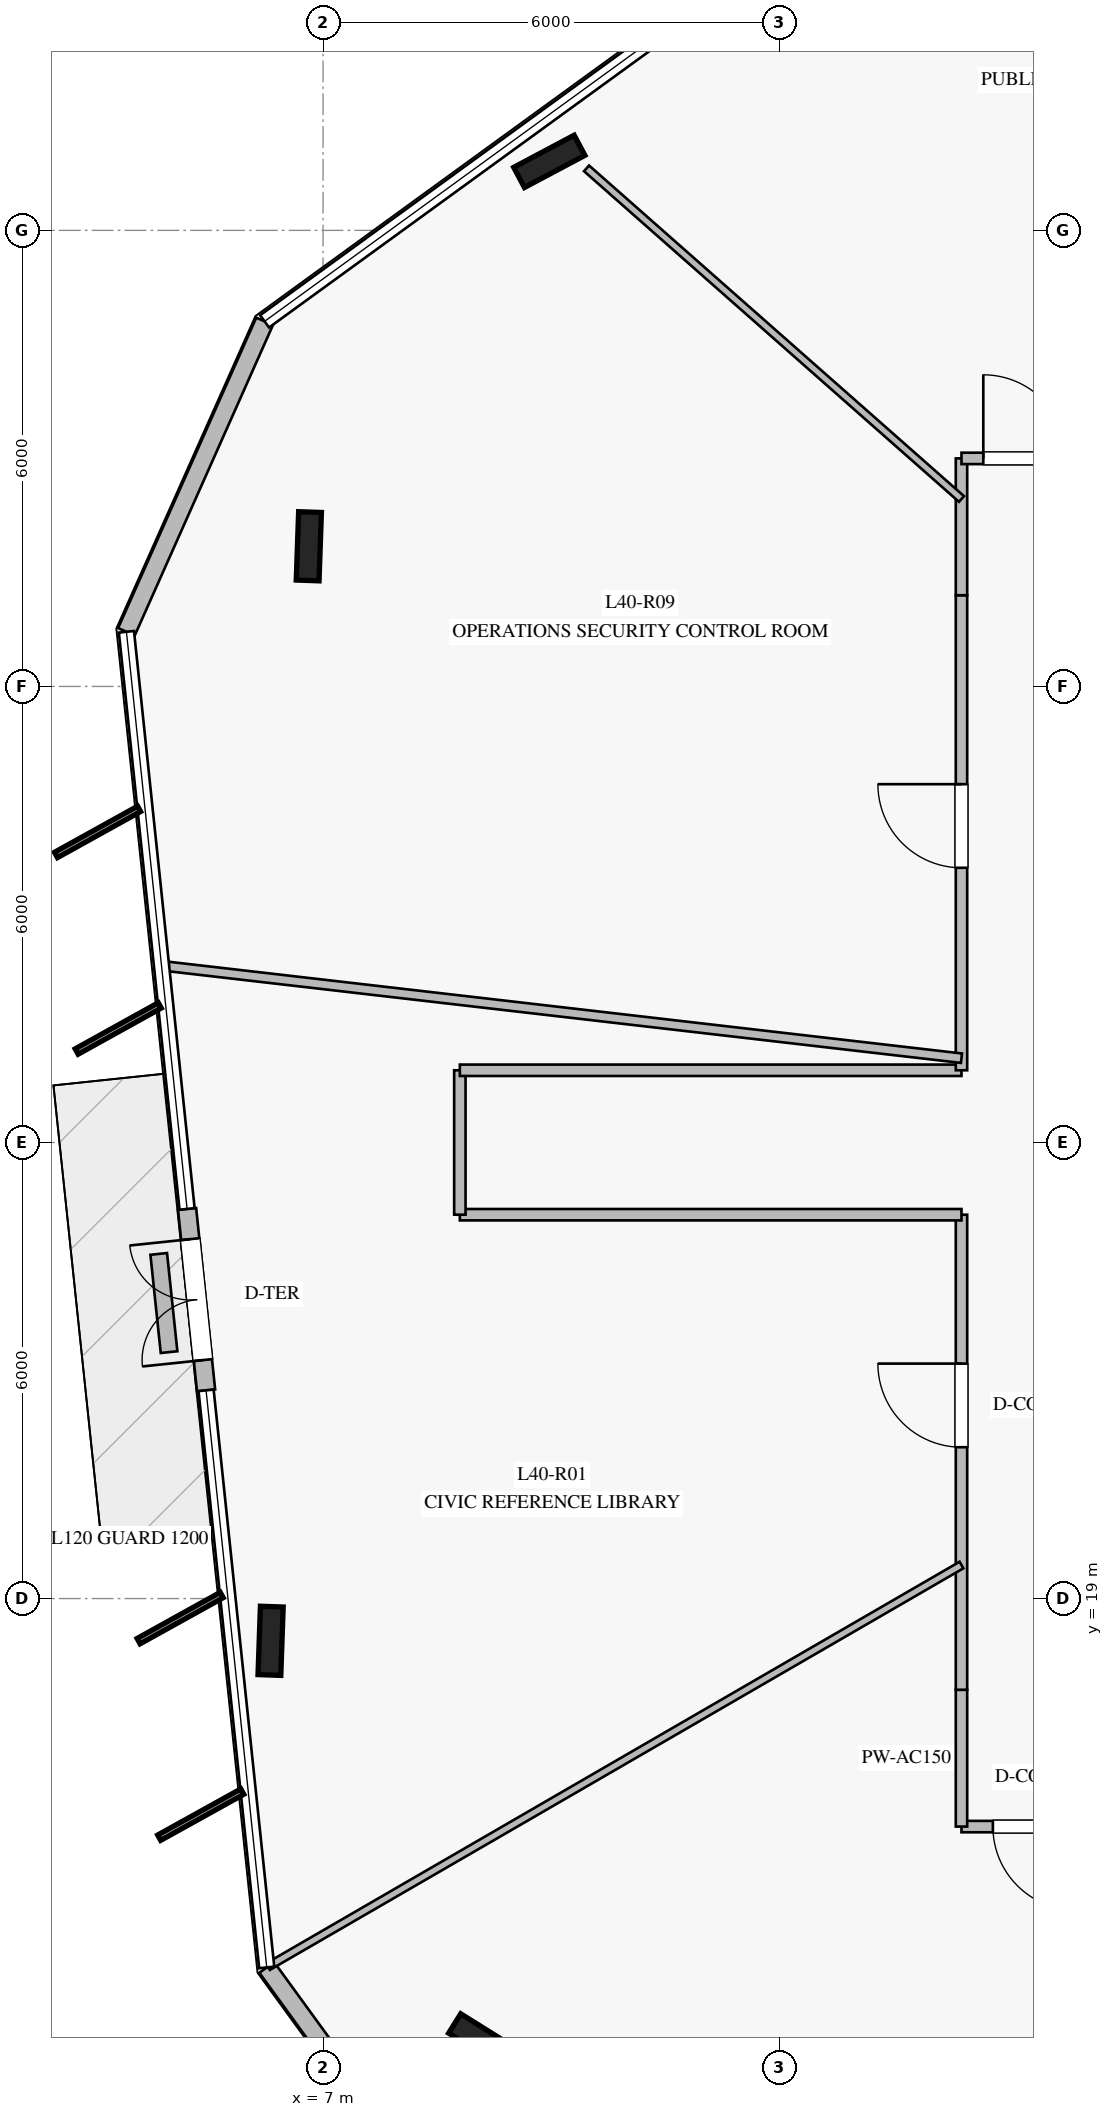
"""IFC4 building model, lengths in metres.
Left out: names, types, materials, properties, quantities, classifications, styles, units other than length and angle.
Written with IfcOpenShell. Run it as: python <this file> out.ifc"""

import sys

from ifc_helpers import new_model, si_unit, direction, frame, frame_2d, origin, origin_2d, place, context, subcontext, project, spatial, rectangle, i_section, extrude, element, fill, save


model = new_model("IFC4")
c1 = context("Model", 3, precision=1e-05, world=origin(), true_north=direction((0.0, 1.0)))
c2 = subcontext(c1, "Body", "Model", "MODEL_VIEW")
j1 = project(units=[si_unit("LENGTHUNIT", "METRE"), si_unit("PLANEANGLEUNIT", "RADIAN")], contexts=[c1])
p1 = place(None, origin())
s1 = spatial("IfcSite", under=j1, at=p1, CompositionType="ELEMENT")
p2 = place(p1, origin())
s2 = spatial("IfcBuilding", under=s1, at=p2, CompositionType="ELEMENT")
p3 = place(p2, frame((0.0, 0.0, 166.4)))
s3 = spatial("IfcBuildingStorey", under=s2, at=p3, CompositionType="ELEMENT", Elevation=166.4)
for number, where, z_axis, x_axis in (
    (1, (9.977, 37.908, 0.0), (0.0, 0.0, 1.0), (0.883, 0.469, 0.0)),
    (2, (6.813, 32.844, 0.0), (0.0, 0.0, 1.0), (0.035, 0.999, 0.0)),
    (3, (6.31, 18.444, 0.0), (0.0, 0.0, 1.0), (0.035, 0.999, 0.0)),
    (4, (9.114, 13.171, 0.0), (0.0, 0.0, 1.0), (-0.848, 0.53, 0.0)),
):
    element("IfcColumn", number, at=place(p3, frame(where, z_axis=z_axis, x_axis=x_axis)), inside=s3, PredefinedType="COLUMN", context=c2, shape_type="SweptSolid", body=[
        extrude(i_section(OverallWidth=0.3, OverallDepth=0.9, WebThickness=0.019, FlangeThickness=0.035, at=origin_2d()), origin(), (0.0, 0.0, 1.0), 4.0),
    ])
p4 = place(p3, frame((6.231, 35.803, 0.0), z_axis=(0.0, 0.0, 1.0), x_axis=(-0.406655262741, -0.913581686159, 0.0)))
e5 = element("IfcWall", 5, at=p4, inside=s3, PredefinedType="STANDARD", context=c2, shape_type="SweptSolid", body=[
    extrude(rectangle(XDim=4.47, YDim=0.24, at=frame_2d((2.235, 0.0))), origin(), (0.0, 0.0, 1.0), 3.7),
])
p5 = place(p3, frame((5.211, 24.126, 0.0), z_axis=(0.0, 0.0, 1.0), x_axis=(0.104165836226, -0.994559942167, 0.0)))
e6 = element("IfcWall", 6, at=p5, inside=s3, PredefinedType="STANDARD", context=c2, shape_type="SweptSolid", body=[
    extrude(rectangle(XDim=2.4, YDim=0.24, at=frame_2d((1.2, 0.0))), origin(), (0.0, 0.0, 1.0), 3.7),
])
p6 = place(p5, frame((0.4, 0.0, 0.0)))
e7 = element("IfcOpeningElement", 7, at=p6, cuts=e6, PredefinedType="OPENING", context=c2, shape_type="SweptSolid", body=[
    extrude(rectangle(XDim=1.6, YDim=2.25, at=frame_2d((0.8, 1.125))), frame((0.0, 0.13, 0.0), z_axis=(0.0, -1.0, 0.0), x_axis=(1.0, 0.0, 0.0)), (0.0, 0.0, 1.0), 0.26),
])
p7 = place(p3, frame((6.259, 14.147, 0.0), z_axis=(0.0, 0.0, 1.0), x_axis=(0.587898873753, -0.80893443136, 0.0)))
e8 = element("IfcWall", 8, at=p7, inside=s3, PredefinedType="STANDARD", context=c2, shape_type="SweptSolid", body=[
    extrude(rectangle(XDim=4.47, YDim=0.24, at=frame_2d((2.235, 0.0))), origin(), (0.0, 0.0, 1.0), 3.7),
])
p8 = place(p3, frame((4.838, 23.534, 0.0), z_axis=(0.0, 0.0, 1.0), x_axis=(0.104860863868, -0.994486902492, 0.0)))
e9 = element("IfcWall", 9, at=p8, inside=s3, PredefinedType="USERDEFINED", context=c2, shape_type="SweptSolid", body=[
    extrude(rectangle(XDim=1.299, YDim=0.22, at=frame_2d((0.649, 0.0))), origin(), (0.0, 0.0, 1.0), 0.4),
])
p9 = place(p3, frame((17.2, 16.0, 0.0), z_axis=(0.0, 0.0, 1.0), x_axis=(-1.0, 0.0, 0.0)))
e10 = element("IfcWall", 10, at=p9, inside=s3, PredefinedType="PARTITIONING", context=c2, shape_type="SweptSolid", body=[
    extrude(rectangle(XDim=1.8, YDim=0.15, at=frame_2d((0.9, 0.0))), origin(), (0.0, 0.0, 1.0), 3.3),
])
p10 = place(p9, frame((0.287, 0.0, 0.0)))
e11 = element("IfcOpeningElement", 11, at=p10, cuts=e10, PredefinedType="OPENING", context=c2, shape_type="SweptSolid", body=[
    extrude(rectangle(XDim=1.1, YDim=2.2, at=frame_2d((0.55, 1.1))), frame((0.0, 0.085, 0.0), z_axis=(0.0, -1.0, 0.0), x_axis=(1.0, 0.0, 0.0)), (0.0, 0.0, 1.0), 0.17),
])
p11 = place(p3, frame((15.4, 16.0, 0.0), z_axis=(0.0, 0.0, 1.0), x_axis=(0.0, 1.0, 0.0)))
e12 = element("IfcWall", 12, at=p11, inside=s3, PredefinedType="PARTITIONING", context=c2, shape_type="SweptSolid", body=[
    extrude(rectangle(XDim=1.8, YDim=0.15, at=frame_2d((0.9, 0.0))), origin(), (0.0, 0.0, 1.0), 3.15),
])
p12 = place(p3, frame((15.4, 17.8, 0.0), z_axis=(0.0, 0.0, 1.0), x_axis=(0.0, 1.0, 0.0)))
e13 = element("IfcWall", 13, at=p12, inside=s3, PredefinedType="PARTITIONING", context=c2, shape_type="SweptSolid", body=[
    extrude(rectangle(XDim=6.25, YDim=0.15, at=frame_2d((3.125, 0.0))), origin(), (0.0, 0.0, 1.0), 3.15),
])
p13 = place(p12, frame((3.191, 0.0, 0.0)))
e14 = element("IfcOpeningElement", 14, at=p13, cuts=e13, PredefinedType="OPENING", context=c2, shape_type="SweptSolid", body=[
    extrude(rectangle(XDim=1.1, YDim=2.2, at=frame_2d((0.55, 1.1))), frame((0.0, 0.085, 0.0), z_axis=(0.0, -1.0, 0.0), x_axis=(1.0, 0.0, 0.0)), (0.0, 0.0, 1.0), 0.17),
])
p14 = place(p3, frame((15.4, 24.05, 0.0), z_axis=(0.0, 0.0, 1.0), x_axis=(-1.0, 0.0, 0.0)))
e15 = element("IfcWall", 15, at=p14, inside=s3, PredefinedType="PARTITIONING", context=c2, shape_type="SweptSolid", body=[
    extrude(rectangle(XDim=6.6, YDim=0.15, at=frame_2d((3.3, 0.0))), origin(), (0.0, 0.0, 1.0), 3.3),
])
p15 = place(p3, frame((8.8, 24.05, 0.0), z_axis=(0.0, 0.0, 1.0), x_axis=(0.0, 1.0, 0.0)))
e16 = element("IfcWall", 16, at=p15, inside=s3, PredefinedType="PARTITIONING", context=c2, shape_type="SweptSolid", body=[
    extrude(rectangle(XDim=1.9, YDim=0.15, at=frame_2d((0.95, 0.0))), origin(), (0.0, 0.0, 1.0), 3.7),
])
p16 = place(p3, frame((8.8, 25.95, 0.0), z_axis=(0.0, 0.0, 1.0), x_axis=(1.0, 0.0, 0.0)))
e17 = element("IfcWall", 17, at=p16, inside=s3, PredefinedType="PARTITIONING", context=c2, shape_type="SweptSolid", body=[
    extrude(rectangle(XDim=6.6, YDim=0.15, at=frame_2d((3.3, 0.0))), origin(), (0.0, 0.0, 1.0), 3.3),
])
p17 = place(p3, frame((15.4, 25.95, 0.0), z_axis=(0.0, 0.0, 1.0), x_axis=(0.0, 1.0, 0.0)))
e18 = element("IfcWall", 18, at=p17, inside=s3, PredefinedType="PARTITIONING", context=c2, shape_type="SweptSolid", body=[
    extrude(rectangle(XDim=6.25, YDim=0.15, at=frame_2d((3.125, 0.0))), origin(), (0.0, 0.0, 1.0), 3.15),
])
p18 = place(p17, frame((2.664, 0.0, 0.0)))
e19 = element("IfcOpeningElement", 19, at=p18, cuts=e18, PredefinedType="OPENING", context=c2, shape_type="SweptSolid", body=[
    extrude(rectangle(XDim=1.1, YDim=2.2, at=frame_2d((0.55, 1.1))), frame((0.0, 0.085, 0.0), z_axis=(0.0, -1.0, 0.0), x_axis=(1.0, 0.0, 0.0)), (0.0, 0.0, 1.0), 0.17),
])
p19 = place(p3, frame((15.4, 32.2, 0.0), z_axis=(0.0, 0.0, 1.0), x_axis=(0.0, 1.0, 0.0)))
e20 = element("IfcWall", 20, at=p19, inside=s3, PredefinedType="PARTITIONING", context=c2, shape_type="SweptSolid", body=[
    extrude(rectangle(XDim=1.8, YDim=0.15, at=frame_2d((0.9, 0.0))), origin(), (0.0, 0.0, 1.0), 3.15),
])
p20 = place(p3, frame((15.4, 34.0, 0.0), z_axis=(0.0, 0.0, 1.0), x_axis=(1.0, 0.0, 0.0)))
e21 = element("IfcWall", 21, at=p20, inside=s3, PredefinedType="PARTITIONING", context=c2, shape_type="SweptSolid", body=[
    extrude(rectangle(XDim=1.8, YDim=0.15, at=frame_2d((0.9, 0.0))), origin(), (0.0, 0.0, 1.0), 3.7),
])
p21 = place(p20, frame((0.287, 0.0, 0.0)))
e22 = element("IfcOpeningElement", 22, at=p21, cuts=e21, PredefinedType="OPENING", context=c2, shape_type="SweptSolid", body=[
    extrude(rectangle(XDim=1.1, YDim=2.2, at=frame_2d((0.55, 1.1))), frame((0.0, 0.085, 0.0), z_axis=(0.0, -1.0, 0.0), x_axis=(1.0, 0.0, 0.0)), (0.0, 0.0, 1.0), 0.17),
])
p22 = place(p3, frame((15.4, 33.466, 0.0), z_axis=(0.0, 0.0, 1.0), x_axis=(-0.750039316512, 0.66139324436, 0.0)))
e23 = element("IfcWall", 23, at=p22, inside=s3, PredefinedType="MOVABLE", context=c2, shape_type="SweptSolid", body=[
    extrude(rectangle(XDim=6.577, YDim=0.1, at=frame_2d((3.289, 0.0))), origin(), (0.0, 0.0, 1.0), 3.15),
])
p23 = place(p3, frame((15.4, 26.109, 0.0), z_axis=(0.0, 0.0, 1.0), x_axis=(-0.993380400017, 0.114871148952, 0.0)))
e24 = element("IfcWall", 24, at=p23, inside=s3, PredefinedType="PARTITIONING", context=c2, shape_type="SweptSolid", body=[
    extrude(rectangle(XDim=10.578, YDim=0.125, at=frame_2d((5.289, 0.0))), origin(), (0.0, 0.0, 1.0), 3.1),
])
p24 = place(p3, frame((15.4, 19.441, 0.0), z_axis=(0.0, 0.0, 1.0), x_axis=(-0.86538348206, -0.501110196442, 0.0)))
e25 = element("IfcWall", 25, at=p24, inside=s3, PredefinedType="MOVABLE", context=c2, shape_type="SweptSolid", body=[
    extrude(rectangle(XDim=10.544, YDim=0.1, at=frame_2d((5.272, 0.0))), origin(), (0.0, 0.0, 1.0), 3.1),
])
p25 = place(p6, frame((1.6, 0.0, 0.0), z_axis=(0.0, 0.0, 1.0), x_axis=(-1.0, 0.0, 0.0)))
e26 = element("IfcDoor", 26, at=p25, inside=s3, OperationType="DOUBLE_DOOR_SINGLE_SWING", PredefinedType="DOOR", context=c2, shape_type="SweptSolid", body=[
    extrude(rectangle(XDim=1.6, YDim=2.25, at=frame_2d((0.8, 1.125))), frame((0.0, 0.025, 0.0), z_axis=(0.0, -1.0, 0.0), x_axis=(1.0, 0.0, 0.0)), (0.0, 0.0, 1.0), 0.05),
])
fill(e7, e26)
p26 = place(p13, origin())
e27 = element("IfcDoor", 27, at=p26, inside=s3, OperationType="SINGLE_SWING_RIGHT", PredefinedType="DOOR", context=c2, shape_type="SweptSolid", body=[
    extrude(rectangle(XDim=1.1, YDim=2.2, at=frame_2d((0.55, 1.1))), frame((0.0, 0.025, 0.0), z_axis=(0.0, -1.0, 0.0), x_axis=(1.0, 0.0, 0.0)), (0.0, 0.0, 1.0), 0.05),
])
fill(e14, e27)
p27 = place(p10, origin())
e28 = element("IfcDoor", 28, at=p27, inside=s3, OperationType="SINGLE_SWING_LEFT", PredefinedType="DOOR", context=c2, shape_type="SweptSolid", body=[
    extrude(rectangle(XDim=1.1, YDim=2.2, at=frame_2d((0.55, 1.1))), frame((0.0, 0.025, 0.0), z_axis=(0.0, -1.0, 0.0), x_axis=(1.0, 0.0, 0.0)), (0.0, 0.0, 1.0), 0.05),
])
fill(e11, e28)
p28 = place(p21, origin())
e29 = element("IfcDoor", 29, at=p28, inside=s3, OperationType="SINGLE_SWING_LEFT", PredefinedType="DOOR", context=c2, shape_type="SweptSolid", body=[
    extrude(rectangle(XDim=1.1, YDim=2.2, at=frame_2d((0.55, 1.1))), frame((0.0, 0.025, 0.0), z_axis=(0.0, -1.0, 0.0), x_axis=(1.0, 0.0, 0.0)), (0.0, 0.0, 1.0), 0.05),
])
fill(e22, e29)
p29 = place(p18, origin())
e30 = element("IfcDoor", 30, at=p29, inside=s3, OperationType="SINGLE_SWING_RIGHT", PredefinedType="DOOR", context=c2, shape_type="SweptSolid", body=[
    extrude(rectangle(XDim=1.1, YDim=2.2, at=frame_2d((0.55, 1.1))), frame((0.0, 0.025, 0.0), z_axis=(0.0, -1.0, 0.0), x_axis=(1.0, 0.0, 0.0)), (0.0, 0.0, 1.0), 0.05),
])
fill(e19, e30)
save(model, sys.argv[1])
